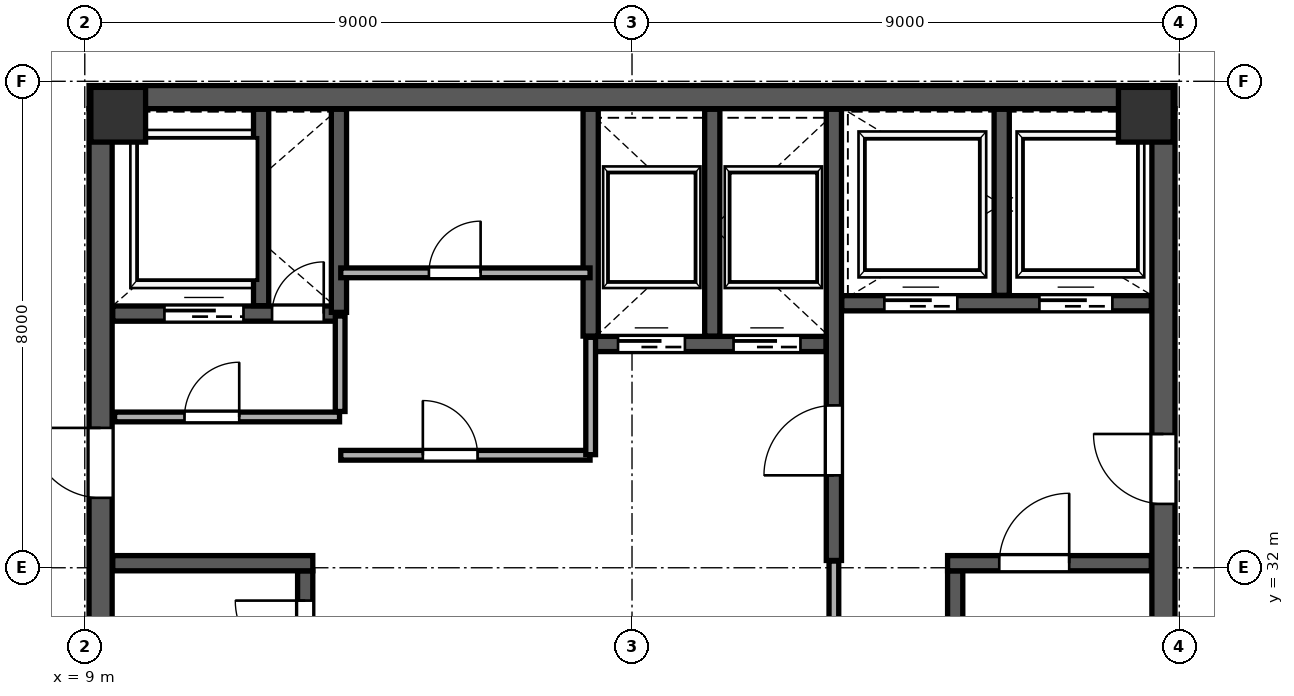
"""IFC4 building model, lengths in metres.
Left out: names, types, materials, properties, quantities, classifications, styles, units other than length and angle.
Written with IfcOpenShell. Run it as: python <this file> out.ifc"""

import sys

from ifc_helpers import new_model, si_unit, direction, frame, frame_2d, origin, origin_2d, place, context, subcontext, project, spatial, rectangle, extrude, source, transform, mapped, element, fill, save


model = new_model("IFC4")
c1 = context("Model", 3, precision=1e-05, world=origin(), true_north=direction((0.0, 1.0)))
c2 = subcontext(c1, "Body", "Model", "MODEL_VIEW")
j1 = project(units=[si_unit("LENGTHUNIT", "METRE"), si_unit("PLANEANGLEUNIT", "RADIAN")], contexts=[c1])
p1 = place(None, origin())
s1 = spatial("IfcSite", under=j1, at=p1, CompositionType="ELEMENT")
p2 = place(p1, origin())
s2 = spatial("IfcBuilding", under=s1, at=p2, CompositionType="ELEMENT")
p3 = place(p2, frame((0.0, 0.0, 324.0)))
s3 = spatial("IfcBuildingStorey", under=s2, at=p3, CompositionType="ELEMENT", Elevation=324.0)
m1 = source(origin(), c2, "Body", "SweptSolid", [
    extrude(rectangle(XDim=0.9, YDim=0.9, at=origin_2d()), origin(), (0.0, 0.0, 1.0), 4.198),
])
for number, where, z_axis, x_axis in (
    (1, (9.55, 39.45, 0.001), (0.0, 0.0, 1.0), (1.0, 0.0, 0.0)),
    (2, (26.45, 39.45, 0.001), (0.0, 0.0, 1.0), (1.0, 0.0, 0.0)),
):
    element("IfcColumn", number, at=place(p3, frame(where, z_axis=z_axis, x_axis=x_axis)), inside=s3, PredefinedType="COLUMN", context=c2, shape_type="MappedRepresentation", body=[
        mapped(m1, transform((0.0, 0.0, 0.0), scale=1.0)),
    ])
p4 = place(p3, frame((9.26, 24.45, 0.0), z_axis=(0.0, 0.0, 1.0), x_axis=(0.0, 1.0, 0.0)))
e3 = element("IfcWall", 3, at=p4, inside=s3, PredefinedType="SHEAR", context=c2, shape_type="SweptSolid", body=[
    extrude(rectangle(XDim=15.1, YDim=0.38, at=frame_2d((7.55, 0.0))), origin(), (0.0, 0.0, 1.0), 3.96),
])
p5 = place(p4, frame((8.7, 0.0, 0.0)))
e4 = element("IfcOpeningElement", 4, at=p5, cuts=e3, PredefinedType="OPENING", context=c2, shape_type="SweptSolid", body=[
    extrude(rectangle(XDim=1.15, YDim=2.2, at=frame_2d((0.575, 1.1))), frame((0.0, 0.2, 0.0), z_axis=(0.0, -1.0, 0.0), x_axis=(1.0, 0.0, 0.0)), (0.0, 0.0, 1.0), 0.4),
])
p6 = place(p3, frame((26.74, 24.45, 0.0), z_axis=(0.0, 0.0, 1.0), x_axis=(0.0, 1.0, 0.0)))
e5 = element("IfcWall", 5, at=p6, inside=s3, PredefinedType="SHEAR", context=c2, shape_type="SweptSolid", body=[
    extrude(rectangle(XDim=15.1, YDim=0.38, at=frame_2d((7.55, 0.0))), origin(), (0.0, 0.0, 1.0), 3.96),
])
p7 = place(p6, frame((8.6, 0.0, 0.0)))
e6 = element("IfcOpeningElement", 6, at=p7, cuts=e5, PredefinedType="OPENING", context=c2, shape_type="SweptSolid", body=[
    extrude(rectangle(XDim=1.15, YDim=2.2, at=frame_2d((0.575, 1.1))), frame((0.0, 0.2, 0.0), z_axis=(0.0, -1.0, 0.0), x_axis=(1.0, 0.0, 0.0)), (0.0, 0.0, 1.0), 0.4),
])
p8 = place(p3, frame((9.07, 39.74, 0.0), z_axis=(0.0, 0.0, 1.0), x_axis=(1.0, 0.0, 0.0)))
e7 = element("IfcWall", 7, at=p8, inside=s3, PredefinedType="SHEAR", context=c2, shape_type="SweptSolid", body=[
    extrude(rectangle(XDim=17.86, YDim=0.38, at=frame_2d((8.93, 0.0))), origin(), (0.0, 0.0, 1.0), 3.96),
])
p9 = place(p3, frame((12.625, 24.46, 0.0), z_axis=(0.0, 0.0, 1.0), x_axis=(0.0, 1.0, 0.0)))
e8 = element("IfcWall", 8, at=p9, inside=s3, PredefinedType="SHEAR", context=c2, shape_type="SweptSolid", body=[
    extrude(rectangle(XDim=7.49, YDim=0.25, at=frame_2d((3.745, 0.0))), origin(), (0.0, 0.0, 1.0), 3.96),
])
p10 = place(p9, frame((5.85, 0.0, 0.0)))
e9 = element("IfcOpeningElement", 9, at=p10, cuts=e8, PredefinedType="OPENING", context=c2, shape_type="SweptSolid", body=[
    extrude(rectangle(XDim=1.15, YDim=2.2, at=frame_2d((0.575, 1.1))), frame((0.0, 0.135, 0.0), z_axis=(0.0, -1.0, 0.0), x_axis=(1.0, 0.0, 0.0)), (0.0, 0.0, 1.0), 0.27),
])
p11 = place(p3, frame((9.46, 32.075, 0.0), z_axis=(0.0, 0.0, 1.0), x_axis=(1.0, 0.0, 0.0)))
e10 = element("IfcWall", 10, at=p11, inside=s3, PredefinedType="SHEAR", context=c2, shape_type="SweptSolid", body=[
    extrude(rectangle(XDim=3.29, YDim=0.25, at=frame_2d((1.645, 0.0))), origin(), (0.0, 0.0, 1.0), 3.96),
])
p12 = place(p3, frame((23.315, 24.46, 0.0), z_axis=(0.0, 0.0, 1.0), x_axis=(0.0, 1.0, 0.0)))
e11 = element("IfcWall", 11, at=p12, inside=s3, PredefinedType="SHEAR", context=c2, shape_type="SweptSolid", body=[
    extrude(rectangle(XDim=7.49, YDim=0.25, at=frame_2d((3.745, 0.0))), origin(), (0.0, 0.0, 1.0), 3.96),
])
p13 = place(p3, frame((23.19, 32.075, 0.0), z_axis=(0.0, 0.0, 1.0), x_axis=(1.0, 0.0, 0.0)))
e12 = element("IfcWall", 12, at=p13, inside=s3, PredefinedType="SHEAR", context=c2, shape_type="SweptSolid", body=[
    extrude(rectangle(XDim=3.35, YDim=0.25, at=frame_2d((1.675, 0.0))), origin(), (0.0, 0.0, 1.0), 3.96),
])
p14 = place(p13, frame((0.85, 0.0, 0.0)))
e13 = element("IfcOpeningElement", 13, at=p14, cuts=e12, PredefinedType="OPENING", context=c2, shape_type="SweptSolid", body=[
    extrude(rectangle(XDim=1.15, YDim=2.2, at=frame_2d((0.575, 1.1))), frame((0.0, 0.135, 0.0), z_axis=(0.0, -1.0, 0.0), x_axis=(1.0, 0.0, 0.0)), (0.0, 0.0, 1.0), 0.27),
])
p15 = place(p3, frame((21.32, 32.12, 0.0), z_axis=(0.0, 0.0, 1.0), x_axis=(0.0, 1.0, 0.0)))
e14 = element("IfcWall", 14, at=p15, inside=s3, PredefinedType="SHEAR", context=c2, shape_type="SweptSolid", body=[
    extrude(rectangle(XDim=7.42, YDim=0.25, at=frame_2d((3.71, 0.0))), origin(), (0.0, 0.0, 1.0), 3.96),
])
p16 = place(p15, frame((1.4, 0.0, 0.0)))
e15 = element("IfcOpeningElement", 15, at=p16, cuts=e14, PredefinedType="OPENING", context=c2, shape_type="SweptSolid", body=[
    extrude(rectangle(XDim=1.15, YDim=2.2, at=frame_2d((0.575, 1.1))), frame((0.0, 0.135, 0.0), z_axis=(0.0, -1.0, 0.0), x_axis=(1.0, 0.0, 0.0)), (0.0, 0.0, 1.0), 0.27),
])
p17 = place(p3, frame((9.46, 36.18, 0.0), z_axis=(0.0, 0.0, 1.0), x_axis=(1.0, 0.0, 0.0)))
e16 = element("IfcWall", 16, at=p17, inside=s3, PredefinedType="SHEAR", context=c2, shape_type="SweptSolid", body=[
    extrude(rectangle(XDim=3.79, YDim=0.25, at=frame_2d((1.895, 0.0))), origin(), (0.0, 0.0, 1.0), 3.96),
])
p18 = place(p17, frame((2.62, 0.0, 0.0)))
e17 = element("IfcOpeningElement", 17, at=p18, cuts=e16, PredefinedType="OPENING", context=c2, shape_type="SweptSolid", body=[
    extrude(rectangle(XDim=0.85, YDim=2.1, at=frame_2d((0.425, 1.05))), frame((0.0, 0.135, 0.0), z_axis=(0.0, -1.0, 0.0), x_axis=(1.0, 0.0, 0.0)), (0.0, 0.0, 1.0), 0.27),
])
p19 = place(p17, frame((0.85, 0.0, 0.0)))
e18 = element("IfcOpeningElement", 18, at=p19, cuts=e16, PredefinedType="OPENING", context=c2, shape_type="SweptSolid", body=[
    extrude(rectangle(XDim=1.3, YDim=2.25, at=frame_2d((0.65, 1.125))), frame((0.0, 0.135, 0.0), z_axis=(0.0, -1.0, 0.0), x_axis=(1.0, 0.0, 0.0)), (0.0, 0.0, 1.0), 0.27),
])
p20 = place(p3, frame((11.9, 36.31, 0.0), z_axis=(0.0, 0.0, 1.0), x_axis=(0.0, 1.0, 0.0)))
e19 = element("IfcWall", 19, at=p20, inside=s3, PredefinedType="SHEAR", context=c2, shape_type="SweptSolid", body=[
    extrude(rectangle(XDim=3.23, YDim=0.25, at=frame_2d((1.615, 0.0))), origin(), (0.0, 0.0, 1.0), 3.96),
])
p21 = place(p3, frame((21.45, 36.35, 0.0), z_axis=(0.0, 0.0, 1.0), x_axis=(1.0, 0.0, 0.0)))
e20 = element("IfcWall", 20, at=p21, inside=s3, PredefinedType="SHEAR", context=c2, shape_type="SweptSolid", body=[
    extrude(rectangle(XDim=5.09, YDim=0.25, at=frame_2d((2.545, 0.0))), origin(), (0.0, 0.0, 1.0), 3.96),
])
p22 = place(p21, frame((0.7, 0.0, 0.0)))
e21 = element("IfcOpeningElement", 21, at=p22, cuts=e20, PredefinedType="OPENING", context=c2, shape_type="SweptSolid", body=[
    extrude(rectangle(XDim=1.2, YDim=2.2, at=frame_2d((0.6, 1.1))), frame((0.0, 0.135, 0.0), z_axis=(0.0, -1.0, 0.0), x_axis=(1.0, 0.0, 0.0)), (0.0, 0.0, 1.0), 0.27),
])
p23 = place(p21, frame((3.25, 0.0, 0.0)))
e22 = element("IfcOpeningElement", 22, at=p23, cuts=e20, PredefinedType="OPENING", context=c2, shape_type="SweptSolid", body=[
    extrude(rectangle(XDim=1.2, YDim=2.2, at=frame_2d((0.6, 1.1))), frame((0.0, 0.135, 0.0), z_axis=(0.0, -1.0, 0.0), x_axis=(1.0, 0.0, 0.0)), (0.0, 0.0, 1.0), 0.27),
])
p24 = place(p3, frame((24.08, 36.48, 0.0), z_axis=(0.0, 0.0, 1.0), x_axis=(0.0, 1.0, 0.0)))
e23 = element("IfcWall", 23, at=p24, inside=s3, PredefinedType="SHEAR", context=c2, shape_type="SweptSolid", body=[
    extrude(rectangle(XDim=3.06, YDim=0.25, at=frame_2d((1.53, 0.0))), origin(), (0.0, 0.0, 1.0), 3.96),
])
p25 = place(p3, frame((13.18, 36.2, 0.0), z_axis=(0.0, 0.0, 1.0), x_axis=(0.0, 1.0, 0.0)))
e24 = element("IfcWall", 24, at=p25, inside=s3, PredefinedType="SHEAR", context=c2, shape_type="SweptSolid", body=[
    extrude(rectangle(XDim=3.34, YDim=0.25, at=frame_2d((1.67, 0.0))), origin(), (0.0, 0.0, 1.0), 3.96),
])
p26 = place(p3, frame((17.32, 35.68, 0.0), z_axis=(0.0, 0.0, 1.0), x_axis=(1.0, 0.0, 0.0)))
e25 = element("IfcWall", 25, at=p26, inside=s3, PredefinedType="SHEAR", context=c2, shape_type="SweptSolid", body=[
    extrude(rectangle(XDim=3.87, YDim=0.25, at=frame_2d((1.935, 0.0))), origin(), (0.0, 0.0, 1.0), 3.96),
])
p27 = place(p26, frame((0.45, 0.0, 0.0)))
e26 = element("IfcOpeningElement", 26, at=p27, cuts=e25, PredefinedType="OPENING", context=c2, shape_type="SweptSolid", body=[
    extrude(rectangle(XDim=1.1, YDim=2.2, at=frame_2d((0.55, 1.1))), frame((0.0, 0.135, 0.0), z_axis=(0.0, -1.0, 0.0), x_axis=(1.0, 0.0, 0.0)), (0.0, 0.0, 1.0), 0.27),
])
p28 = place(p26, frame((2.35, 0.0, 0.0)))
e27 = element("IfcOpeningElement", 27, at=p28, cuts=e25, PredefinedType="OPENING", context=c2, shape_type="SweptSolid", body=[
    extrude(rectangle(XDim=1.1, YDim=2.2, at=frame_2d((0.55, 1.1))), frame((0.0, 0.135, 0.0), z_axis=(0.0, -1.0, 0.0), x_axis=(1.0, 0.0, 0.0)), (0.0, 0.0, 1.0), 0.27),
])
for number, where, z_axis, x_axis in (
    (28, (17.32, 35.81, 0.0), (0.0, 0.0, 1.0), (0.0, 1.0, 0.0)),
    (29, (19.32, 35.81, 0.0), (0.0, 0.0, 1.0), (0.0, 1.0, 0.0)),
):
    element("IfcWall", number, at=place(p3, frame(where, z_axis=z_axis, x_axis=x_axis)), inside=s3, PredefinedType="SHEAR", context=c2, shape_type="SweptSolid", body=[
        extrude(rectangle(XDim=3.73, YDim=0.25, at=frame_2d((1.865, 0.0))), origin(), (0.0, 0.0, 1.0), 3.96),
    ])
p29 = place(p3, frame((9.49, 34.48, 0.0), z_axis=(0.0, 0.0, 1.0), x_axis=(1.0, 0.0, 0.0)))
e30 = element("IfcWall", 30, at=p29, inside=s3, PredefinedType="PARTITIONING", context=c2, shape_type="SweptSolid", body=[
    extrude(rectangle(XDim=3.7, YDim=0.16, at=frame_2d((1.85, 0.0))), origin(), (0.0, 0.0, 1.0), 3.96),
])
p30 = place(p29, frame((1.15, 0.0, 0.0)))
e31 = element("IfcOpeningElement", 31, at=p30, cuts=e30, PredefinedType="OPENING", context=c2, shape_type="SweptSolid", body=[
    extrude(rectangle(XDim=0.9, YDim=2.15, at=frame_2d((0.45, 1.075))), frame((0.0, 0.09, 0.0), z_axis=(0.0, -1.0, 0.0), x_axis=(1.0, 0.0, 0.0)), (0.0, 0.0, 1.0), 0.18),
])
p31 = place(p3, frame((13.2, 34.57, 0.0), z_axis=(0.0, 0.0, 1.0), x_axis=(0.0, 1.0, 0.0)))
e32 = element("IfcWall", 32, at=p31, inside=s3, PredefinedType="PARTITIONING", context=c2, shape_type="SweptSolid", body=[
    extrude(rectangle(XDim=1.57, YDim=0.16, at=frame_2d((0.785, 0.0))), origin(), (0.0, 0.0, 1.0), 3.96),
])
p32 = place(p3, frame((13.21, 33.85, 0.0), z_axis=(0.0, 0.0, 1.0), x_axis=(1.0, 0.0, 0.0)))
e33 = element("IfcWall", 33, at=p32, inside=s3, PredefinedType="PARTITIONING", context=c2, shape_type="SweptSolid", body=[
    extrude(rectangle(XDim=4.1, YDim=0.16, at=frame_2d((2.05, 0.0))), origin(), (0.0, 0.0, 1.0), 3.96),
])
p33 = place(p32, frame((1.35, 0.0, 0.0)))
e34 = element("IfcOpeningElement", 34, at=p33, cuts=e33, PredefinedType="OPENING", context=c2, shape_type="SweptSolid", body=[
    extrude(rectangle(XDim=0.9, YDim=2.15, at=frame_2d((0.45, 1.075))), frame((0.0, 0.09, 0.0), z_axis=(0.0, -1.0, 0.0), x_axis=(1.0, 0.0, 0.0)), (0.0, 0.0, 1.0), 0.18),
])
p34 = place(p3, frame((17.32, 33.86, 0.0), z_axis=(0.0, 0.0, 1.0), x_axis=(0.0, 1.0, 0.0)))
e35 = element("IfcWall", 35, at=p34, inside=s3, PredefinedType="PARTITIONING", context=c2, shape_type="SweptSolid", body=[
    extrude(rectangle(XDim=1.93, YDim=0.16, at=frame_2d((0.965, 0.0))), origin(), (0.0, 0.0, 1.0), 3.96),
])
p35 = place(p3, frame((13.21, 36.85, 0.0), z_axis=(0.0, 0.0, 1.0), x_axis=(1.0, 0.0, 0.0)))
e36 = element("IfcWall", 36, at=p35, inside=s3, PredefinedType="PARTITIONING", context=c2, shape_type="SweptSolid", body=[
    extrude(rectangle(XDim=4.1, YDim=0.16, at=frame_2d((2.05, 0.0))), origin(), (0.0, 0.0, 1.0), 3.96),
])
p36 = place(p35, frame((1.45, 0.0, 0.0)))
e37 = element("IfcOpeningElement", 37, at=p36, cuts=e36, PredefinedType="OPENING", context=c2, shape_type="SweptSolid", body=[
    extrude(rectangle(XDim=0.85, YDim=2.1, at=frame_2d((0.425, 1.05))), frame((0.0, 0.09, 0.0), z_axis=(0.0, -1.0, 0.0), x_axis=(1.0, 0.0, 0.0)), (0.0, 0.0, 1.0), 0.18),
])
p37 = place(p3, frame((21.32, 29.19, 0.0), z_axis=(0.0, 0.0, 1.0), x_axis=(0.0, 1.0, 0.0)))
e38 = element("IfcWall", 38, at=p37, inside=s3, PredefinedType="PARTITIONING", context=c2, shape_type="SweptSolid", body=[
    extrude(rectangle(XDim=2.92, YDim=0.16, at=frame_2d((1.46, 0.0))), origin(), (0.0, 0.0, 1.0), 3.96),
])
p38 = place(p3, frame((3.742, 32.498, 0.0), z_axis=(0.0, 0.0, 1.0), x_axis=(0.500005830994, -0.866022037233, 0.0)))
e39 = element("IfcWall", 39, at=p38, inside=s3, PredefinedType="PARTITIONING", context=c2, shape_type="SweptSolid", body=[
    extrude(rectangle(XDim=14.07, YDim=0.16, at=frame_2d((7.035, 0.0))), origin(), (0.0, 0.0, 1.0), 3.96),
])
p39 = place(p38, frame((1.15, 0.0, 0.0)))
e40 = element("IfcOpeningElement", 40, at=p39, cuts=e39, PredefinedType="OPENING", context=c2, shape_type="SweptSolid", body=[
    extrude(rectangle(XDim=0.95, YDim=2.15, at=frame_2d((0.475, 1.075))), frame((0.0, 0.09, 0.0), z_axis=(0.0, -1.0, 0.0), x_axis=(1.0, 0.0, 0.0)), (0.0, 0.0, 1.0), 0.18),
])
p40 = place(p3, frame((23.284, 49.669, 0.0), z_axis=(0.0, 0.0, 1.0), x_axis=(0.500004637929, -0.866022726058, 0.0)))
e41 = element("IfcWall", 41, at=p40, inside=s3, PredefinedType="PARTITIONING", context=c2, shape_type="SweptSolid", body=[
    extrude(rectangle(XDim=20.67, YDim=0.115, at=frame_2d((10.335, 0.0))), origin(), (0.0, 0.0, 1.0), 3.96),
])
p41 = place(p40, frame((1.05, 0.0, 0.0)))
e42 = element("IfcOpeningElement", 42, at=p41, cuts=e41, PredefinedType="OPENING", context=c2, shape_type="SweptSolid", body=[
    extrude(rectangle(XDim=0.95, YDim=2.15, at=frame_2d((0.475, 1.075))), frame((0.0, 0.067, 0.0), z_axis=(0.0, -1.0, 0.0), x_axis=(1.0, 0.0, 0.0)), (0.0, 0.0, 1.0), 0.135),
])
p42 = place(p40, frame((8.2, 0.0, 0.0)))
e43 = element("IfcOpeningElement", 43, at=p42, cuts=e41, PredefinedType="OPENING", context=c2, shape_type="SweptSolid", body=[
    extrude(rectangle(XDim=0.95, YDim=2.15, at=frame_2d((0.475, 1.075))), frame((0.0, 0.067, 0.0), z_axis=(0.0, -1.0, 0.0), x_axis=(1.0, 0.0, 0.0)), (0.0, 0.0, 1.0), 0.135),
])
p43 = place(p3, frame((2.506, 37.719, 0.0), z_axis=(0.0, 0.0, 1.0), x_axis=(0.866023290802, 0.500003659775, 0.0)))
e44 = element("IfcWall", 44, at=p43, inside=s3, PredefinedType="PARTITIONING", context=c2, shape_type="SweptSolid", body=[
    extrude(rectangle(XDim=29.61, YDim=0.115, at=frame_2d((14.805, 0.0))), origin(), (0.0, 0.0, 1.0), 3.96),
])
p44 = place(p43, frame((2.1, 0.0, 0.0)))
e45 = element("IfcOpeningElement", 45, at=p44, cuts=e44, PredefinedType="OPENING", context=c2, shape_type="SweptSolid", body=[
    extrude(rectangle(XDim=0.95, YDim=2.15, at=frame_2d((0.475, 1.075))), frame((0.0, 0.067, 0.0), z_axis=(0.0, -1.0, 0.0), x_axis=(1.0, 0.0, 0.0)), (0.0, 0.0, 1.0), 0.135),
])
p45 = place(p43, frame((11.8, 0.0, 0.0)))
e46 = element("IfcOpeningElement", 46, at=p45, cuts=e44, PredefinedType="OPENING", context=c2, shape_type="SweptSolid", body=[
    extrude(rectangle(XDim=0.95, YDim=2.15, at=frame_2d((0.475, 1.075))), frame((0.0, 0.067, 0.0), z_axis=(0.0, -1.0, 0.0), x_axis=(1.0, 0.0, 0.0)), (0.0, 0.0, 1.0), 0.135),
])
m2 = source(origin(), c2, "Body", "SweptSolid", [
    extrude(rectangle(XDim=1.15, YDim=2.2, at=frame_2d((0.575, 1.1))), frame((0.0, 0.025, 0.0), z_axis=(0.0, -1.0, 0.0), x_axis=(1.0, 0.0, 0.0)), (0.0, 0.0, 1.0), 0.05),
])
p46 = place(p10, origin())
e47 = element("IfcDoor", 47, at=p46, inside=s3, OperationType="SINGLE_SWING_RIGHT", PredefinedType="DOOR", context=c2, shape_type="MappedRepresentation", body=[
    mapped(m2, transform((0.0, 0.0, 0.0), scale=1.0)),
])
fill(e9, e47)
m3 = source(origin(), c2, "Body", "SweptSolid", [
    extrude(rectangle(XDim=1.15, YDim=2.2, at=frame_2d((0.575, 1.1))), frame((0.0, 0.025, 0.0), z_axis=(0.0, -1.0, 0.0), x_axis=(1.0, 0.0, 0.0)), (0.0, 0.0, 1.0), 0.05),
])
p47 = place(p16, origin())
e48 = element("IfcDoor", 48, at=p47, inside=s3, OperationType="SINGLE_SWING_LEFT", PredefinedType="DOOR", context=c2, shape_type="MappedRepresentation", body=[
    mapped(m3, transform((0.0, 0.0, 0.0), scale=1.0)),
])
fill(e15, e48)
p48 = place(p14, origin())
e49 = element("IfcDoor", 49, at=p48, inside=s3, OperationType="SINGLE_SWING_RIGHT", PredefinedType="DOOR", context=c2, shape_type="MappedRepresentation", body=[
    mapped(m2, transform((0.0, 0.0, 0.0), scale=1.0)),
])
fill(e13, e49)
p49 = place(p7, origin())
e50 = element("IfcDoor", 50, at=p49, inside=s3, OperationType="SINGLE_SWING_RIGHT", PredefinedType="DOOR", context=c2, shape_type="MappedRepresentation", body=[
    mapped(m3, transform((0.0, 0.0, 0.0), scale=1.0)),
])
fill(e6, e50)
p50 = place(p5, origin())
e51 = element("IfcDoor", 51, at=p50, inside=s3, OperationType="SINGLE_SWING_RIGHT", PredefinedType="DOOR", context=c2, shape_type="MappedRepresentation", body=[
    mapped(m3, transform((0.0, 0.0, 0.0), scale=1.0)),
])
fill(e4, e51)
m4 = source(origin(), c2, "Body", "SweptSolid", [
    extrude(rectangle(XDim=0.85, YDim=2.1, at=frame_2d((0.425, 1.05))), frame((0.0, 0.025, 0.0), z_axis=(0.0, -1.0, 0.0), x_axis=(1.0, 0.0, 0.0)), (0.0, 0.0, 1.0), 0.05),
])
p51 = place(p18, origin())
e52 = element("IfcDoor", 52, at=p51, inside=s3, OperationType="SINGLE_SWING_RIGHT", PredefinedType="DOOR", context=c2, shape_type="MappedRepresentation", body=[
    mapped(m4, transform((0.0, 0.0, 0.0), scale=1.0)),
])
fill(e17, e52)
m5 = source(origin(), c2, "Body", "SweptSolid", [
    extrude(rectangle(XDim=1.1, YDim=2.2, at=frame_2d((0.55, 1.1))), frame((0.0, 0.025, 0.0), z_axis=(0.0, -1.0, 0.0), x_axis=(1.0, 0.0, 0.0)), (0.0, 0.0, 1.0), 0.05),
])
p52 = place(p27, origin())
e53 = element("IfcDoor", 53, at=p52, inside=s3, OperationType="SLIDING_TO_LEFT", PredefinedType="DOOR", context=c2, shape_type="MappedRepresentation", body=[
    mapped(m5, transform((0.0, 0.0, 0.0), scale=1.0)),
])
fill(e26, e53)
p53 = place(p28, origin())
e54 = element("IfcDoor", 54, at=p53, inside=s3, OperationType="SLIDING_TO_RIGHT", PredefinedType="DOOR", context=c2, shape_type="MappedRepresentation", body=[
    mapped(m5, transform((0.0, 0.0, 0.0), scale=1.0)),
])
fill(e27, e54)
m6 = source(origin(), c2, "Body", "SweptSolid", [
    extrude(rectangle(XDim=1.2, YDim=2.2, at=frame_2d((0.6, 1.1))), frame((0.0, 0.025, 0.0), z_axis=(0.0, -1.0, 0.0), x_axis=(1.0, 0.0, 0.0)), (0.0, 0.0, 1.0), 0.05),
])
p54 = place(p22, origin())
e55 = element("IfcDoor", 55, at=p54, inside=s3, OperationType="SLIDING_TO_LEFT", PredefinedType="DOOR", context=c2, shape_type="MappedRepresentation", body=[
    mapped(m6, transform((0.0, 0.0, 0.0), scale=1.0)),
])
fill(e21, e55)
p55 = place(p23, origin())
e56 = element("IfcDoor", 56, at=p55, inside=s3, OperationType="SLIDING_TO_RIGHT", PredefinedType="DOOR", context=c2, shape_type="MappedRepresentation", body=[
    mapped(m6, transform((0.0, 0.0, 0.0), scale=1.0)),
])
fill(e22, e56)
m7 = source(origin(), c2, "Body", "SweptSolid", [
    extrude(rectangle(XDim=1.3, YDim=2.25, at=frame_2d((0.65, 1.125))), frame((0.0, 0.025, 0.0), z_axis=(0.0, -1.0, 0.0), x_axis=(1.0, 0.0, 0.0)), (0.0, 0.0, 1.0), 0.05),
])
p56 = place(p19, origin())
e57 = element("IfcDoor", 57, at=p56, inside=s3, OperationType="SLIDING_TO_LEFT", PredefinedType="DOOR", context=c2, shape_type="MappedRepresentation", body=[
    mapped(m7, transform((0.0, 0.0, 0.0), scale=1.0)),
])
fill(e18, e57)
m8 = source(origin(), c2, "Body", "SweptSolid", [
    extrude(rectangle(XDim=0.9, YDim=2.15, at=frame_2d((0.45, 1.075))), frame((0.0, 0.025, 0.0), z_axis=(0.0, -1.0, 0.0), x_axis=(1.0, 0.0, 0.0)), (0.0, 0.0, 1.0), 0.05),
])
p57 = place(p30, origin())
e58 = element("IfcDoor", 58, at=p57, inside=s3, OperationType="SINGLE_SWING_RIGHT", PredefinedType="DOOR", context=c2, shape_type="MappedRepresentation", body=[
    mapped(m8, transform((0.0, 0.0, 0.0), scale=1.0)),
])
fill(e31, e58)
p58 = place(p33, origin())
e59 = element("IfcDoor", 59, at=p58, inside=s3, OperationType="SINGLE_SWING_LEFT", PredefinedType="DOOR", context=c2, shape_type="MappedRepresentation", body=[
    mapped(m8, transform((0.0, 0.0, 0.0), scale=1.0)),
])
fill(e34, e59)
p59 = place(p36, origin())
e60 = element("IfcDoor", 60, at=p59, inside=s3, OperationType="SINGLE_SWING_RIGHT", PredefinedType="DOOR", context=c2, shape_type="MappedRepresentation", body=[
    mapped(m4, transform((0.0, 0.0, 0.0), scale=1.0)),
])
fill(e37, e60)
save(model, sys.argv[1])
